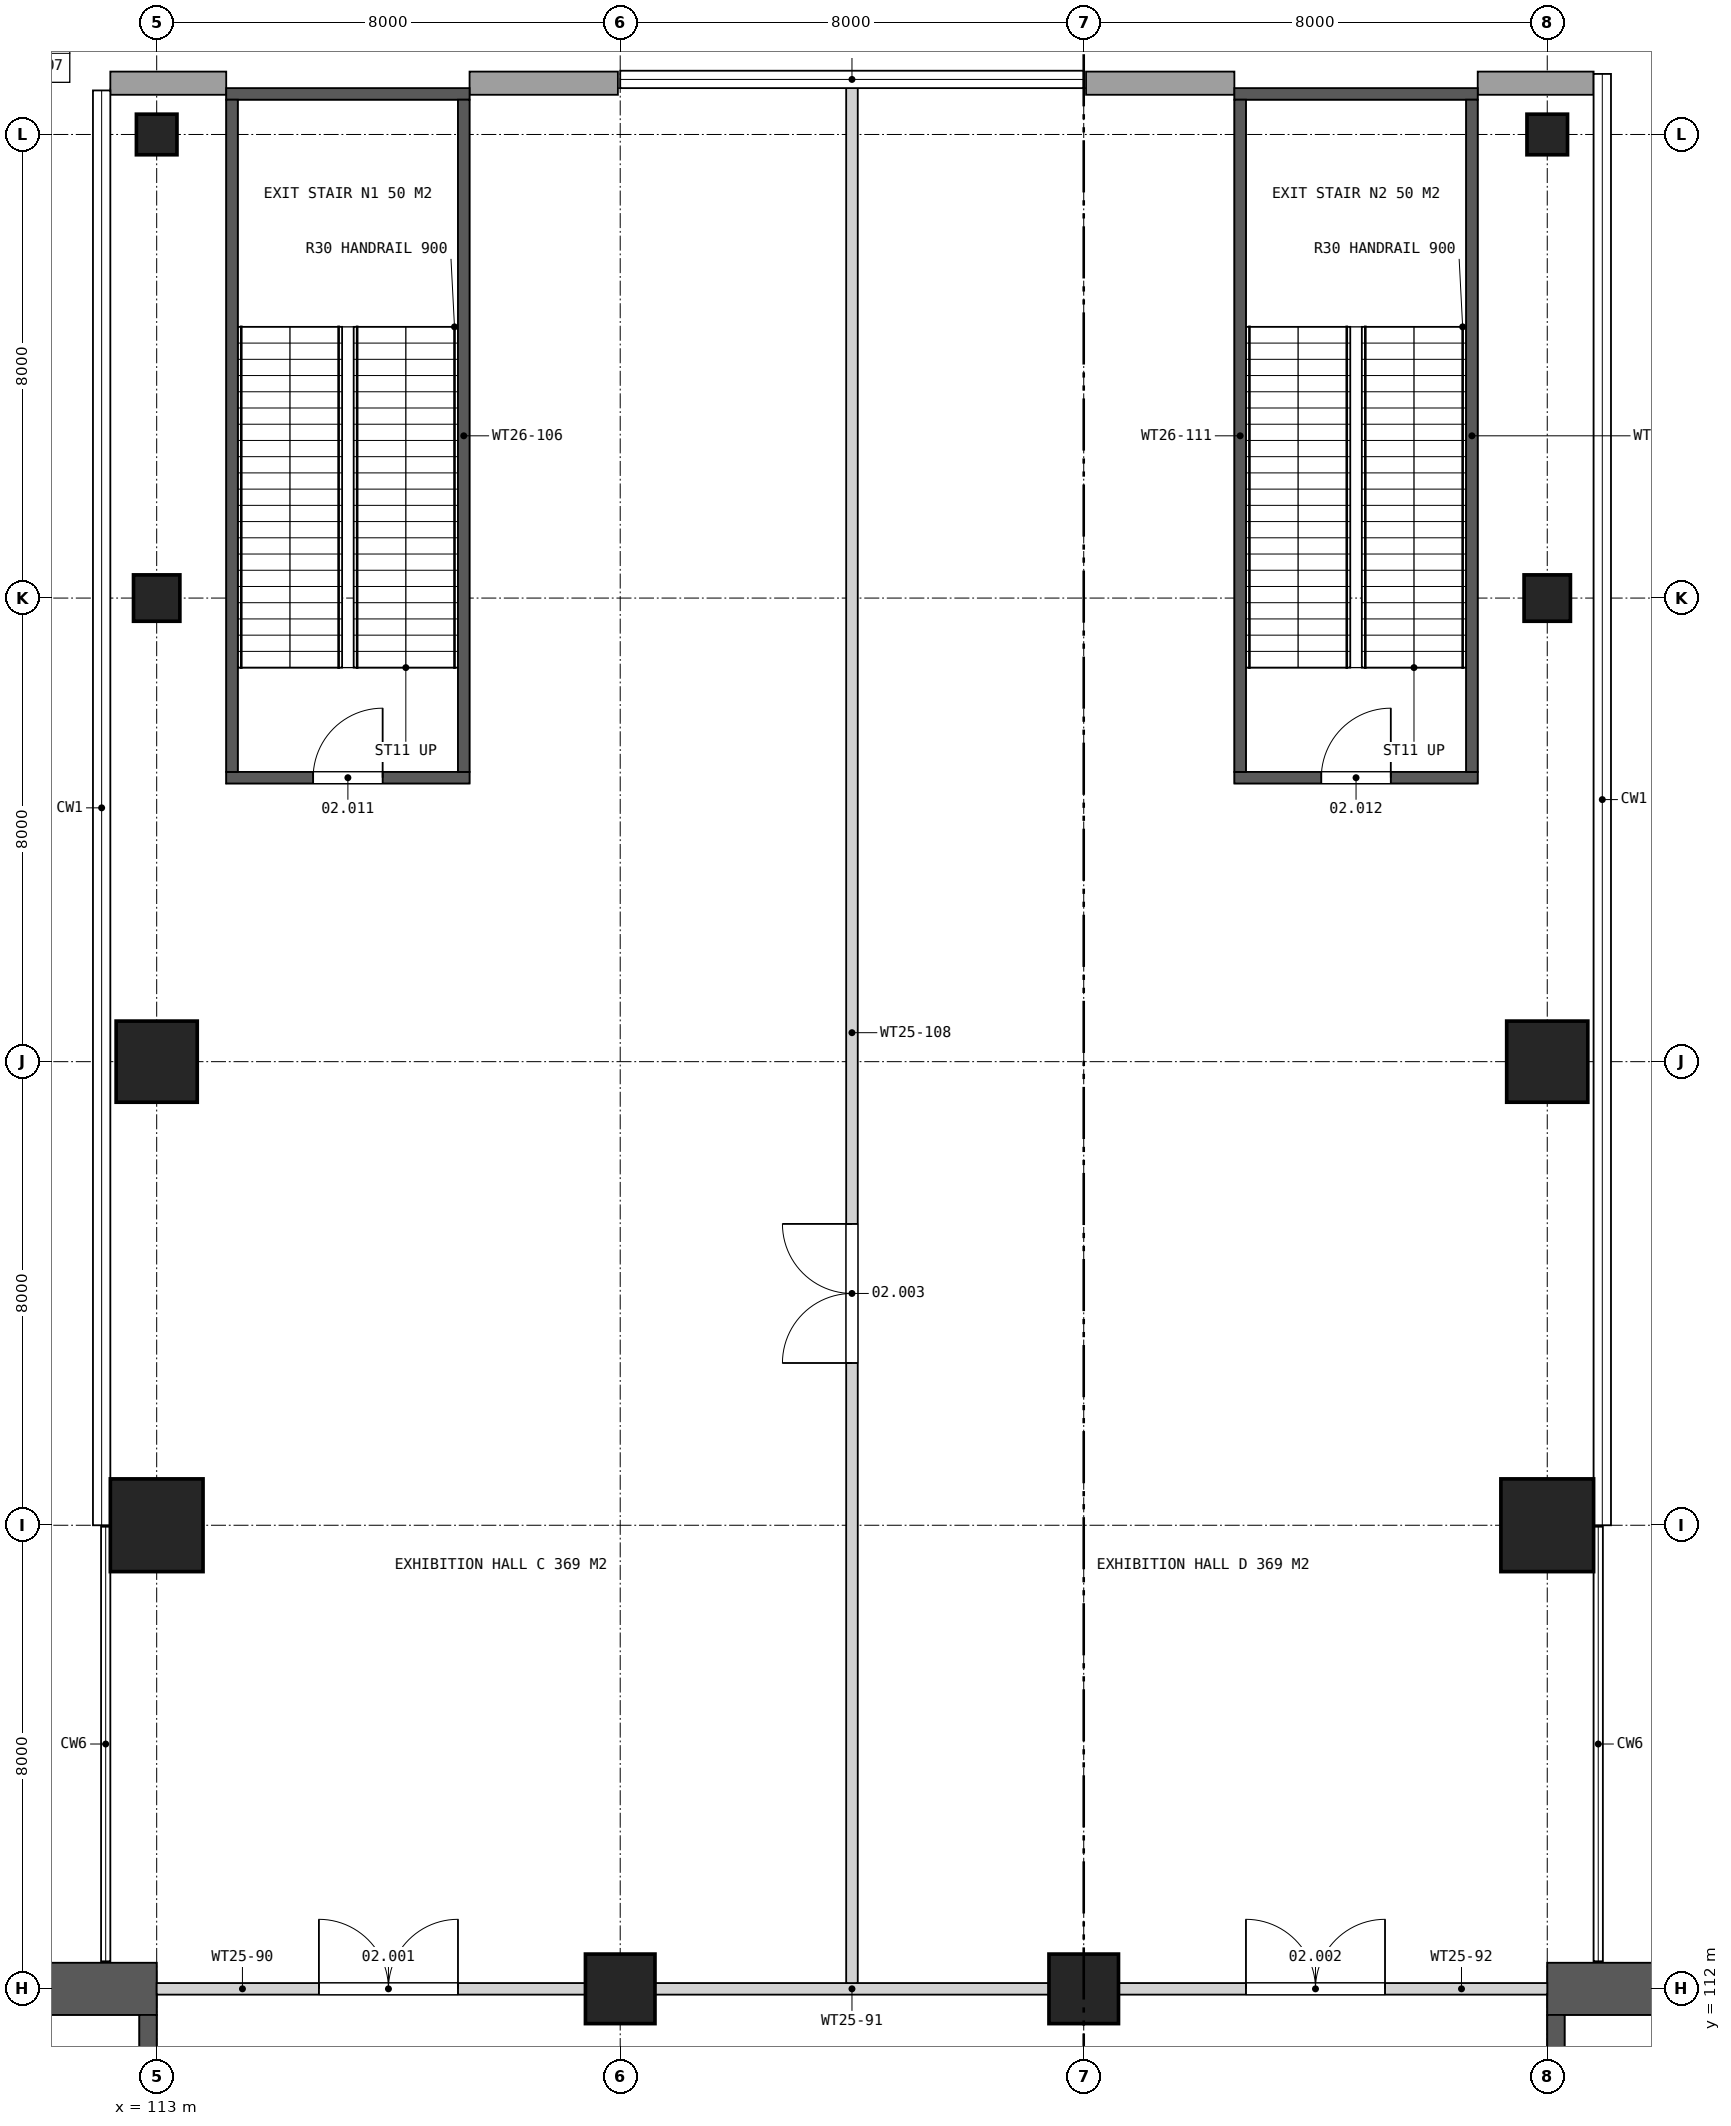
"""IFC4 building model, lengths in metres.
Left out: names, types, materials, properties, quantities, classifications, styles, units other than length and angle.
Written with IfcOpenShell. Run it as: python <this file> out.ifc"""

import sys

from ifc_helpers import new_model, si_unit, direction, frame, frame_2d, origin, origin_2d, place, context, subcontext, project, spatial, rectangle, extrude, element, fill, save


model = new_model("IFC4")
c1 = context("Model", 3, precision=1e-05, world=origin(), true_north=direction((0.0, 1.0)))
c2 = subcontext(c1, "Body", "Model", "MODEL_VIEW")
j1 = project(units=[si_unit("LENGTHUNIT", "METRE"), si_unit("PLANEANGLEUNIT", "RADIAN")], contexts=[c1])
p1 = place(None, origin())
s1 = spatial("IfcSite", under=j1, at=p1, CompositionType="ELEMENT")
p2 = place(p1, origin())
s2 = spatial("IfcBuilding", under=s1, at=p2, CompositionType="ELEMENT")
p3 = place(p2, frame((0.0, 0.0, 17.5)))
s3 = spatial("IfcBuildingStorey", under=s2, at=p3, CompositionType="ELEMENT", Elevation=17.5)
p4 = place(p3, frame((113.0, 120.0, 0.0), z_axis=(0.0, 0.0, 1.0), x_axis=(1.0, 0.0, 0.0)))
e1 = element("IfcColumn", 1, at=p4, inside=s3, PredefinedType="COLUMN", context=c2, shape_type="SweptSolid", body=[
    extrude(rectangle(XDim=1.6, YDim=1.6, at=origin_2d()), origin(), (0.0, 0.0, 1.0), 7.5),
])
p5 = place(p3, frame((113.0, 128.0, 0.0), z_axis=(0.0, 0.0, 1.0), x_axis=(1.0, 0.0, 0.0)))
e2 = element("IfcColumn", 2, at=p5, inside=s3, PredefinedType="COLUMN", context=c2, shape_type="SweptSolid", body=[
    extrude(rectangle(XDim=1.4, YDim=1.4, at=origin_2d()), origin(), (0.0, 0.0, 1.0), 7.5),
])
p6 = place(p3, frame((113.0, 136.0, 0.0), z_axis=(0.0, 0.0, 1.0), x_axis=(1.0, 0.0, 0.0)))
e3 = element("IfcColumn", 3, at=p6, inside=s3, PredefinedType="COLUMN", context=c2, shape_type="SweptSolid", body=[
    extrude(rectangle(XDim=0.8, YDim=0.8, at=origin_2d()), origin(), (0.0, 0.0, 1.0), 7.5),
])
p7 = place(p3, frame((113.0, 144.0, 0.0), z_axis=(0.0, 0.0, 1.0), x_axis=(1.0, 0.0, 0.0)))
e4 = element("IfcColumn", 4, at=p7, inside=s3, PredefinedType="COLUMN", context=c2, shape_type="SweptSolid", body=[
    extrude(rectangle(XDim=0.7, YDim=0.7, at=origin_2d()), origin(), (0.0, 0.0, 1.0), 7.5),
])
for number, where, z_axis, x_axis in (
    (5, (121.0, 112.0, 0.0), (0.0, 0.0, 1.0), (1.0, 0.0, 0.0)),
    (6, (129.0, 112.0, 0.0), (0.0, 0.0, 1.0), (1.0, 0.0, 0.0)),
):
    element("IfcColumn", number, at=place(p3, frame(where, z_axis=z_axis, x_axis=x_axis)), inside=s3, PredefinedType="COLUMN", context=c2, shape_type="SweptSolid", body=[
        extrude(rectangle(XDim=1.2, YDim=1.2, at=origin_2d()), origin(), (0.0, 0.0, 1.0), 7.5),
    ])
p8 = place(p3, frame((137.0, 120.0, 0.0), z_axis=(0.0, 0.0, 1.0), x_axis=(1.0, 0.0, 0.0)))
e7 = element("IfcColumn", 7, at=p8, inside=s3, PredefinedType="COLUMN", context=c2, shape_type="SweptSolid", body=[
    extrude(rectangle(XDim=1.6, YDim=1.6, at=origin_2d()), origin(), (0.0, 0.0, 1.0), 7.5),
])
p9 = place(p3, frame((137.0, 128.0, 0.0), z_axis=(0.0, 0.0, 1.0), x_axis=(1.0, 0.0, 0.0)))
e8 = element("IfcColumn", 8, at=p9, inside=s3, PredefinedType="COLUMN", context=c2, shape_type="SweptSolid", body=[
    extrude(rectangle(XDim=1.4, YDim=1.4, at=origin_2d()), origin(), (0.0, 0.0, 1.0), 7.5),
])
p10 = place(p3, frame((137.0, 136.0, 0.0), z_axis=(0.0, 0.0, 1.0), x_axis=(1.0, 0.0, 0.0)))
e9 = element("IfcColumn", 9, at=p10, inside=s3, PredefinedType="COLUMN", context=c2, shape_type="SweptSolid", body=[
    extrude(rectangle(XDim=0.8, YDim=0.8, at=origin_2d()), origin(), (0.0, 0.0, 1.0), 7.5),
])
p11 = place(p3, frame((137.0, 144.0, 0.0), z_axis=(0.0, 0.0, 1.0), x_axis=(1.0, 0.0, 0.0)))
e10 = element("IfcColumn", 10, at=p11, inside=s3, PredefinedType="COLUMN", context=c2, shape_type="SweptSolid", body=[
    extrude(rectangle(XDim=0.7, YDim=0.7, at=origin_2d()), origin(), (0.0, 0.0, 1.0), 7.5),
])
p12 = place(p3, frame((137.0, 112.0, 0.0), z_axis=(0.0, 0.0, 1.0), x_axis=(1.0, 0.0, 0.0)))
e11 = element("IfcWall", 11, at=p12, inside=s3, PredefinedType="SHEAR", context=c2, shape_type="SweptSolid", body=[
    extrude(rectangle(XDim=7.1, YDim=0.9, at=frame_2d((3.55, 0.0))), origin(), (0.0, 0.0, 1.0), 7.5),
])
p13 = place(p3, frame((137.15, 105.7, 0.0), z_axis=(0.0, 0.0, 1.0), x_axis=(0.0, 1.0, 0.0)))
e12 = element("IfcWall", 12, at=p13, inside=s3, PredefinedType="SHEAR", context=c2, shape_type="SweptSolid", body=[
    extrude(rectangle(XDim=5.85, YDim=0.3, at=frame_2d((2.925, 0.0))), origin(), (0.0, 0.0, 1.0), 7.5),
])
p14 = place(p3, frame((113.0, 112.0, 0.0), z_axis=(0.0, 0.0, 1.0), x_axis=(-1.0, 0.0, 0.0)))
e13 = element("IfcWall", 13, at=p14, inside=s3, PredefinedType="SHEAR", context=c2, shape_type="SweptSolid", body=[
    extrude(rectangle(XDim=7.1, YDim=0.9, at=frame_2d((3.55, 0.0))), origin(), (0.0, 0.0, 1.0), 7.5),
])
p15 = place(p3, frame((112.85, 111.55, 0.0), z_axis=(0.0, 0.0, 1.0), x_axis=(0.0, -1.0, 0.0)))
e14 = element("IfcWall", 14, at=p15, inside=s3, PredefinedType="SHEAR", context=c2, shape_type="SweptSolid", body=[
    extrude(rectangle(XDim=5.85, YDim=0.3, at=frame_2d((2.925, 0.0))), origin(), (0.0, 0.0, 1.0), 7.5),
])
p16 = place(p3, frame((137.8, 144.885, 0.0), z_axis=(0.0, 0.0, 1.0), x_axis=(-1.0, 0.0, 0.0)))
e15 = element("IfcWall", 15, at=p16, inside=s3, PredefinedType="SOLIDWALL", context=c2, shape_type="SweptSolid", body=[
    extrude(rectangle(XDim=2.0, YDim=0.4, at=frame_2d((1.0, 0.0))), origin(), (0.0, 0.0, 1.0), 6.6),
])
for number, where, z_axis, x_axis in (
    (16, (131.6, 144.885, 0.0), (0.0, 0.0, 1.0), (-1.0, 0.0, 0.0)),
    (17, (120.96, 144.885, 0.0), (0.0, 0.0, 1.0), (-1.0, 0.0, 0.0)),
):
    element("IfcWall", number, at=place(p3, frame(where, z_axis=z_axis, x_axis=x_axis)), inside=s3, PredefinedType="SOLIDWALL", context=c2, shape_type="SweptSolid", body=[
        extrude(rectangle(XDim=2.56, YDim=0.4, at=frame_2d((1.28, 0.0))), origin(), (0.0, 0.0, 1.0), 6.2),
    ])
p17 = place(p3, frame((114.2, 144.885, 0.0), z_axis=(0.0, 0.0, 1.0), x_axis=(-1.0, 0.0, 0.0)))
e18 = element("IfcWall", 18, at=p17, inside=s3, PredefinedType="SOLIDWALL", context=c2, shape_type="SweptSolid", body=[
    extrude(rectangle(XDim=2.0, YDim=0.4, at=frame_2d((1.0, 0.0))), origin(), (0.0, 0.0, 1.0), 6.6),
])
p18 = place(p3, frame((113.0, 112.0, 0.0), z_axis=(0.0, 0.0, 1.0), x_axis=(1.0, 0.0, 0.0)))
e19 = element("IfcWall", 19, at=p18, inside=s3, PredefinedType="PARTITIONING", context=c2, shape_type="SweptSolid", body=[
    extrude(rectangle(XDim=7.4, YDim=0.2, at=frame_2d((3.7, 0.0))), origin(), (0.0, 0.0, 1.0), 6.551),
])
p19 = place(p18, frame((2.8, 0.0, 0.0)))
e20 = element("IfcOpeningElement", 20, at=p19, cuts=e19, PredefinedType="OPENING", context=c2, shape_type="SweptSolid", body=[
    extrude(rectangle(XDim=2.4, YDim=2.4, at=frame_2d((1.2, 1.2))), frame((0.0, 0.11, 0.0), z_axis=(0.0, -1.0, 0.0), x_axis=(1.0, 0.0, 0.0)), (0.0, 0.0, 1.0), 0.22),
])
p20 = place(p3, frame((121.6, 112.0, 0.0), z_axis=(0.0, 0.0, 1.0), x_axis=(1.0, 0.0, 0.0)))
e21 = element("IfcWall", 21, at=p20, inside=s3, PredefinedType="PARTITIONING", context=c2, shape_type="SweptSolid", body=[
    extrude(rectangle(XDim=6.8, YDim=0.2, at=frame_2d((3.4, 0.0))), origin(), (0.0, 0.0, 1.0), 6.555),
])
p21 = place(p3, frame((129.6, 112.0, 0.0), z_axis=(0.0, 0.0, 1.0), x_axis=(1.0, 0.0, 0.0)))
e22 = element("IfcWall", 22, at=p21, inside=s3, PredefinedType="PARTITIONING", context=c2, shape_type="SweptSolid", body=[
    extrude(rectangle(XDim=7.4, YDim=0.2, at=frame_2d((3.7, 0.0))), origin(), (0.0, 0.0, 1.0), 6.551),
])
p22 = place(p21, frame((2.2, 0.0, 0.0)))
e23 = element("IfcOpeningElement", 23, at=p22, cuts=e22, PredefinedType="OPENING", context=c2, shape_type="SweptSolid", body=[
    extrude(rectangle(XDim=2.4, YDim=2.4, at=frame_2d((1.2, 1.2))), frame((0.0, 0.11, 0.0), z_axis=(0.0, -1.0, 0.0), x_axis=(1.0, 0.0, 0.0)), (0.0, 0.0, 1.0), 0.22),
])
p23 = place(p3, frame((114.2, 132.9, 0.0), z_axis=(0.0, 0.0, 1.0), x_axis=(1.0, 0.0, 0.0)))
e24 = element("IfcWall", 24, at=p23, inside=s3, PredefinedType="SOLIDWALL", context=c2, shape_type="SweptSolid", body=[
    extrude(rectangle(XDim=4.2, YDim=0.2, at=frame_2d((2.1, 0.0))), origin(), (0.0, 0.0, 1.0), 7.5),
])
p24 = place(p23, frame((1.5, 0.0, 0.0)))
e25 = element("IfcOpeningElement", 25, at=p24, cuts=e24, PredefinedType="OPENING", context=c2, shape_type="SweptSolid", body=[
    extrude(rectangle(XDim=1.2, YDim=2.2, at=frame_2d((0.6, 1.1))), frame((0.0, 0.11, 0.0), z_axis=(0.0, -1.0, 0.0), x_axis=(1.0, 0.0, 0.0)), (0.0, 0.0, 1.0), 0.22),
])
p25 = place(p3, frame((131.6, 132.9, 0.0), z_axis=(0.0, 0.0, 1.0), x_axis=(1.0, 0.0, 0.0)))
e26 = element("IfcWall", 26, at=p25, inside=s3, PredefinedType="SOLIDWALL", context=c2, shape_type="SweptSolid", body=[
    extrude(rectangle(XDim=4.2, YDim=0.2, at=frame_2d((2.1, 0.0))), origin(), (0.0, 0.0, 1.0), 7.5),
])
p26 = place(p25, frame((1.5, 0.0, 0.0)))
e27 = element("IfcOpeningElement", 27, at=p26, cuts=e26, PredefinedType="OPENING", context=c2, shape_type="SweptSolid", body=[
    extrude(rectangle(XDim=1.2, YDim=2.2, at=frame_2d((0.6, 1.1))), frame((0.0, 0.11, 0.0), z_axis=(0.0, -1.0, 0.0), x_axis=(1.0, 0.0, 0.0)), (0.0, 0.0, 1.0), 0.22),
])
for number, where, z_axis, x_axis in (
    (28, (114.2, 144.7, 0.0), (0.0, 0.0, 1.0), (1.0, 0.0, 0.0)),
    (29, (131.6, 144.7, 0.0), (0.0, 0.0, 1.0), (1.0, 0.0, 0.0)),
):
    element("IfcWall", number, at=place(p3, frame(where, z_axis=z_axis, x_axis=x_axis)), inside=s3, PredefinedType="SOLIDWALL", context=c2, shape_type="SweptSolid", body=[
        extrude(rectangle(XDim=4.2, YDim=0.2, at=frame_2d((2.1, 0.0))), origin(), (0.0, 0.0, 1.0), 7.5),
    ])
for number, where, z_axis, x_axis in (
    (30, (114.3, 133.0, 0.0), (0.0, 0.0, 1.0), (0.0, 1.0, 0.0)),
    (31, (118.3, 133.0, 0.0), (0.0, 0.0, 1.0), (0.0, 1.0, 0.0)),
):
    element("IfcWall", number, at=place(p3, frame(where, z_axis=z_axis, x_axis=x_axis)), inside=s3, PredefinedType="SOLIDWALL", context=c2, shape_type="SweptSolid", body=[
        extrude(rectangle(XDim=11.6, YDim=0.2, at=frame_2d((5.8, 0.0))), origin(), (0.0, 0.0, 1.0), 7.5),
    ])
p27 = place(p3, frame((125.0, 112.1, 0.0), z_axis=(0.0, 0.0, 1.0), x_axis=(0.0, 1.0, 0.0)))
e32 = element("IfcWall", 32, at=p27, inside=s3, PredefinedType="PARTITIONING", context=c2, shape_type="SweptSolid", body=[
    extrude(rectangle(XDim=32.8, YDim=0.2, at=frame_2d((16.4, 0.0))), origin(), (0.0, 0.0, 1.0), 5.6),
])
p28 = place(p27, frame((10.7, 0.0, 0.0)))
e33 = element("IfcOpeningElement", 33, at=p28, cuts=e32, PredefinedType="OPENING", context=c2, shape_type="SweptSolid", body=[
    extrude(rectangle(XDim=2.4, YDim=2.4, at=frame_2d((1.2, 1.2))), frame((0.0, 0.11, 0.0), z_axis=(0.0, -1.0, 0.0), x_axis=(1.0, 0.0, 0.0)), (0.0, 0.0, 1.0), 0.22),
])
for number, where, z_axis, x_axis in (
    (34, (131.7, 133.0, 0.0), (0.0, 0.0, 1.0), (0.0, 1.0, 0.0)),
    (35, (135.7, 133.0, 0.0), (0.0, 0.0, 1.0), (0.0, 1.0, 0.0)),
):
    element("IfcWall", number, at=place(p3, frame(where, z_axis=z_axis, x_axis=x_axis)), inside=s3, PredefinedType="SOLIDWALL", context=c2, shape_type="SweptSolid", body=[
        extrude(rectangle(XDim=11.6, YDim=0.2, at=frame_2d((5.8, 0.0))), origin(), (0.0, 0.0, 1.0), 7.5),
    ])
p29 = place(p19, origin())
e36 = element("IfcDoor", 36, at=p29, inside=s3, OperationType="DOUBLE_DOOR_SINGLE_SWING", PredefinedType="DOOR", context=c2, shape_type="SweptSolid", body=[
    extrude(rectangle(XDim=2.4, YDim=2.4, at=frame_2d((1.2, 1.2))), frame((0.0, 0.025, 0.0), z_axis=(0.0, -1.0, 0.0), x_axis=(1.0, 0.0, 0.0)), (0.0, 0.0, 1.0), 0.05),
])
fill(e20, e36)
p30 = place(p22, origin())
e37 = element("IfcDoor", 37, at=p30, inside=s3, OperationType="DOUBLE_DOOR_SINGLE_SWING", PredefinedType="DOOR", context=c2, shape_type="SweptSolid", body=[
    extrude(rectangle(XDim=2.4, YDim=2.4, at=frame_2d((1.2, 1.2))), frame((0.0, 0.025, 0.0), z_axis=(0.0, -1.0, 0.0), x_axis=(1.0, 0.0, 0.0)), (0.0, 0.0, 1.0), 0.05),
])
fill(e23, e37)
p31 = place(p28, origin())
e38 = element("IfcDoor", 38, at=p31, inside=s3, OperationType="DOUBLE_DOOR_SINGLE_SWING", PredefinedType="DOOR", context=c2, shape_type="SweptSolid", body=[
    extrude(rectangle(XDim=2.4, YDim=2.4, at=frame_2d((1.2, 1.2))), frame((0.0, 0.025, 0.0), z_axis=(0.0, -1.0, 0.0), x_axis=(1.0, 0.0, 0.0)), (0.0, 0.0, 1.0), 0.05),
])
fill(e33, e38)
p32 = place(p24, origin())
e39 = element("IfcDoor", 39, at=p32, inside=s3, OperationType="SINGLE_SWING_RIGHT", PredefinedType="DOOR", context=c2, shape_type="SweptSolid", body=[
    extrude(rectangle(XDim=1.2, YDim=2.2, at=frame_2d((0.6, 1.1))), frame((0.0, 0.025, 0.0), z_axis=(0.0, -1.0, 0.0), x_axis=(1.0, 0.0, 0.0)), (0.0, 0.0, 1.0), 0.05),
])
fill(e25, e39)
p33 = place(p26, origin())
e40 = element("IfcDoor", 40, at=p33, inside=s3, OperationType="SINGLE_SWING_RIGHT", PredefinedType="DOOR", context=c2, shape_type="SweptSolid", body=[
    extrude(rectangle(XDim=1.2, YDim=2.2, at=frame_2d((0.6, 1.1))), frame((0.0, 0.025, 0.0), z_axis=(0.0, -1.0, 0.0), x_axis=(1.0, 0.0, 0.0)), (0.0, 0.0, 1.0), 0.05),
])
fill(e27, e40)
save(model, sys.argv[1])
